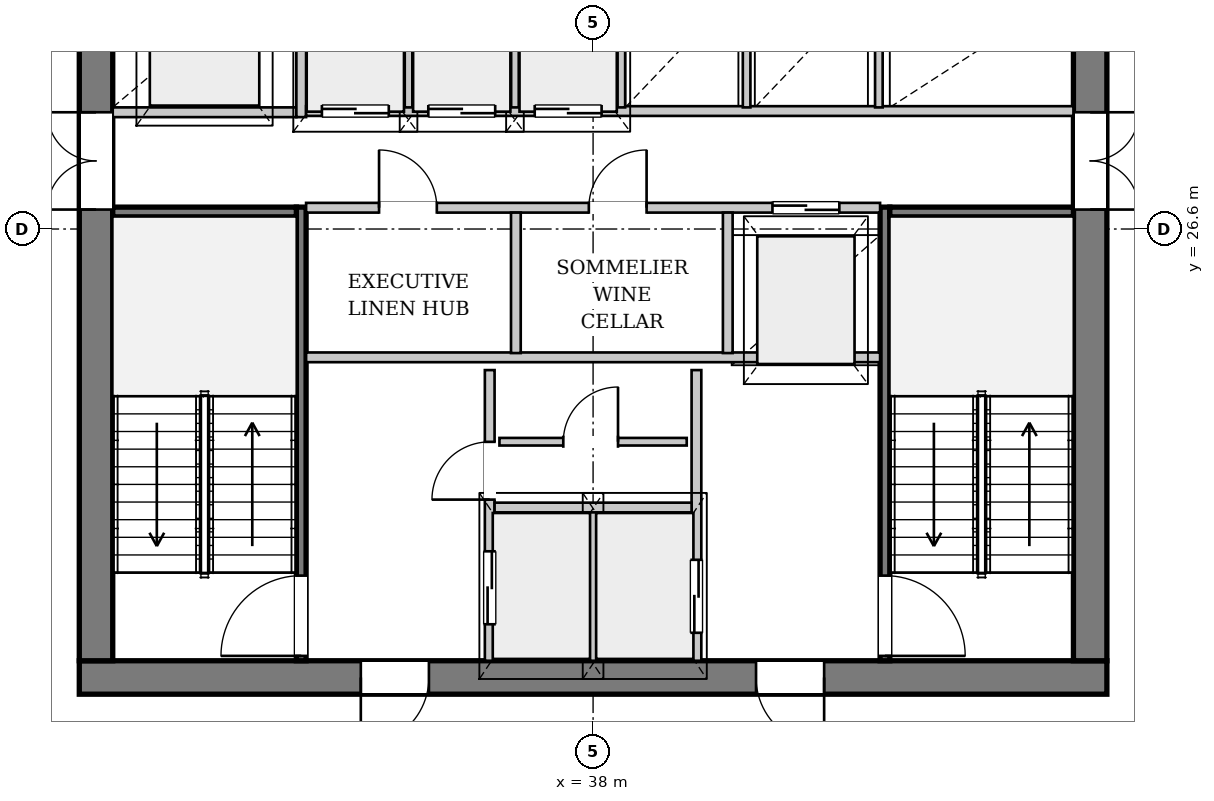
"""IFC4 building model, lengths in metres.
Left out: names, types, materials, properties, quantities, classifications, styles, units other than length and angle.
Written with IfcOpenShell. Run it as: python <this file> out.ifc"""

import sys

from ifc_helpers import new_model, si_unit, direction, frame, frame_2d, origin, place, context, subcontext, project, spatial, rectangle, extrude, source, transform, mapped, element, fill, save


model = new_model("IFC4")
c1 = context("Model", 3, precision=1e-05, world=origin(), true_north=direction((0.0, 1.0)))
c2 = subcontext(c1, "Body", "Model", "MODEL_VIEW")
j1 = project(units=[si_unit("LENGTHUNIT", "METRE"), si_unit("PLANEANGLEUNIT", "RADIAN")], contexts=[c1])
p1 = place(None, origin())
s1 = spatial("IfcSite", under=j1, at=p1, CompositionType="ELEMENT")
p2 = place(p1, origin())
s2 = spatial("IfcBuilding", under=s1, at=p2, CompositionType="ELEMENT")
p3 = place(p2, frame((0.0, 0.0, 189.2)))
s3 = spatial("IfcBuildingStorey", under=s2, at=p3, CompositionType="ELEMENT", Elevation=189.2)
p4 = place(p3, frame((53.032, 21.835, 0.0), z_axis=(0.0, 0.0, 1.0), x_axis=(-0.573201612269, -0.819414371178, 0.0)))
e1 = element("IfcWall", 1, at=p4, inside=s3, PredefinedType="SOLIDWALL", context=c2, shape_type="SweptSolid", body=[
    extrude(rectangle(XDim=23.255, YDim=0.32, at=frame_2d((11.627, 0.0))), origin(), (0.0, 0.0, 1.0), 2.722),
])
p5 = place(p4, frame((6.691, 0.0, 0.0)))
e2 = element("IfcOpeningElement", 2, at=p5, cuts=e1, PredefinedType="OPENING", context=c2, shape_type="SweptSolid", body=[
    extrude(rectangle(XDim=1.5, YDim=2.3, at=frame_2d((0.75, 1.15))), frame((0.0, 0.17, 0.0), z_axis=(0.0, -1.0, 0.0), x_axis=(1.0, 0.0, 0.0)), (0.0, 0.0, 1.0), 0.34),
])
p6 = place(p4, frame((14.308, 0.0, 0.252)))
e3 = element("IfcOpeningElement", 3, at=p6, cuts=e1, PredefinedType="OPENING", context=c2, shape_type="SweptSolid", body=[
    extrude(rectangle(XDim=2.6, YDim=2.35, at=frame_2d((1.3, 1.175))), frame((0.0, 0.17, 0.0), z_axis=(0.0, -1.0, 0.0), x_axis=(1.0, 0.0, 0.0)), (0.0, 0.0, 1.0), 0.34),
])
p7 = place(p4, frame((2.957, 0.0, 0.65)))
e4 = element("IfcOpeningElement", 4, at=p7, cuts=e1, PredefinedType="OPENING", context=c2, shape_type="SweptSolid", body=[
    extrude(rectangle(XDim=1.2, YDim=1.5, at=frame_2d((0.6, 0.75))), frame((0.0, 0.17, 0.0), z_axis=(0.0, -1.0, 0.0), x_axis=(1.0, 0.0, 0.0)), (0.0, 0.0, 1.0), 0.34),
])
p8 = place(p3, frame((46.45, 19.225, 0.0), z_axis=(0.0, 0.0, 1.0), x_axis=(-1.0, 0.0, 0.0)))
e5 = element("IfcWall", 5, at=p8, inside=s3, PredefinedType="SHEAR", context=c2, shape_type="SweptSolid", body=[
    extrude(rectangle(XDim=16.9, YDim=0.55, at=frame_2d((8.45, 0.0))), origin(), (0.0, 0.0, 1.0), 3.33),
])
p9 = place(p8, frame((4.65, 0.0, 0.0)))
e6 = element("IfcOpeningElement", 6, at=p9, cuts=e5, PredefinedType="OPENING", context=c2, shape_type="SweptSolid", body=[
    extrude(rectangle(XDim=1.12, YDim=2.25, at=frame_2d((0.56, 1.125))), frame((0.0, 0.285, 0.0), z_axis=(0.0, -1.0, 0.0), x_axis=(1.0, 0.0, 0.0)), (0.0, 0.0, 1.0), 0.57),
])
p10 = place(p8, frame((11.15, 0.0, 0.0)))
e7 = element("IfcOpeningElement", 7, at=p10, cuts=e5, PredefinedType="OPENING", context=c2, shape_type="SweptSolid", body=[
    extrude(rectangle(XDim=1.12, YDim=2.25, at=frame_2d((0.56, 1.125))), frame((0.0, 0.285, 0.0), z_axis=(0.0, -1.0, 0.0), x_axis=(1.0, 0.0, 0.0)), (0.0, 0.0, 1.0), 0.57),
])
p11 = place(p3, frame((29.825, 19.5, 0.0), z_axis=(0.0, 0.0, 1.0), x_axis=(0.0, 1.0, 0.0)))
e8 = element("IfcWall", 8, at=p11, inside=s3, PredefinedType="SHEAR", context=c2, shape_type="SweptSolid", body=[
    extrude(rectangle(XDim=14.2, YDim=0.55, at=frame_2d((7.1, 0.0))), origin(), (0.0, 0.0, 1.0), 3.33),
])
p12 = place(p11, frame((7.42, 0.0, 0.0)))
e9 = element("IfcOpeningElement", 9, at=p12, cuts=e8, PredefinedType="OPENING", context=c2, shape_type="SweptSolid", body=[
    extrude(rectangle(XDim=1.6, YDim=2.2, at=frame_2d((0.8, 1.1))), frame((0.0, 0.285, 0.0), z_axis=(0.0, -1.0, 0.0), x_axis=(1.0, 0.0, 0.0)), (0.0, 0.0, 1.0), 0.57),
])
p13 = place(p3, frame((46.175, 33.7, 0.0), z_axis=(0.0, 0.0, 1.0), x_axis=(0.0, -1.0, 0.0)))
e10 = element("IfcWall", 10, at=p13, inside=s3, PredefinedType="SHEAR", context=c2, shape_type="SweptSolid", body=[
    extrude(rectangle(XDim=14.2, YDim=0.55, at=frame_2d((7.1, 0.0))), origin(), (0.0, 0.0, 1.0), 3.33),
])
p14 = place(p13, frame((5.18, 0.0, 0.0)))
e11 = element("IfcOpeningElement", 11, at=p14, cuts=e10, PredefinedType="OPENING", context=c2, shape_type="SweptSolid", body=[
    extrude(rectangle(XDim=1.6, YDim=2.2, at=frame_2d((0.8, 1.1))), frame((0.0, 0.285, 0.0), z_axis=(0.0, -1.0, 0.0), x_axis=(1.0, 0.0, 0.0)), (0.0, 0.0, 1.0), 0.57),
])
p15 = place(p13, frame((2.05, 0.0, 0.0)))
e12 = element("IfcOpeningElement", 12, at=p15, cuts=e10, PredefinedType="OPENING", context=c2, shape_type="SweptSolid", body=[
    extrude(rectangle(XDim=0.95, YDim=2.1, at=frame_2d((0.475, 1.05))), frame((0.0, 0.285, 0.0), z_axis=(0.0, -1.0, 0.0), x_axis=(1.0, 0.0, 0.0)), (0.0, 0.0, 1.0), 0.57),
])
p16 = place(p3, frame((33.2, 19.5, 0.0), z_axis=(0.0, 0.0, 1.0), x_axis=(0.0, 1.0, 0.0)))
e13 = element("IfcWall", 13, at=p16, inside=s3, PredefinedType="PARTITIONING", context=c2, shape_type="SweptSolid", body=[
    extrude(rectangle(XDim=7.46, YDim=0.16, at=frame_2d((3.73, 0.0))), origin(), (0.0, 0.0, 1.0), 3.33),
])
p17 = place(p16, frame((0.08, 0.0, 0.0)))
e14 = element("IfcOpeningElement", 14, at=p17, cuts=e13, PredefinedType="OPENING", context=c2, shape_type="SweptSolid", body=[
    extrude(rectangle(XDim=1.32, YDim=2.2, at=frame_2d((0.66, 1.1))), frame((0.0, 0.09, 0.0), z_axis=(0.0, -1.0, 0.0), x_axis=(1.0, 0.0, 0.0)), (0.0, 0.0, 1.0), 0.18),
])
p18 = place(p3, frame((30.1, 26.88, 0.0), z_axis=(0.0, 0.0, 1.0), x_axis=(1.0, 0.0, 0.0)))
e15 = element("IfcWall", 15, at=p18, inside=s3, PredefinedType="PARTITIONING", context=c2, shape_type="SweptSolid", body=[
    extrude(rectangle(XDim=3.02, YDim=0.16, at=frame_2d((1.51, 0.0))), origin(), (0.0, 0.0, 1.0), 3.33),
])
p19 = place(p3, frame((42.8, 26.96, 0.0), z_axis=(0.0, 0.0, 1.0), x_axis=(0.0, -1.0, 0.0)))
e16 = element("IfcWall", 16, at=p19, inside=s3, PredefinedType="PARTITIONING", context=c2, shape_type="SweptSolid", body=[
    extrude(rectangle(XDim=7.46, YDim=0.16, at=frame_2d((3.73, 0.0))), origin(), (0.0, 0.0, 1.0), 3.33),
])
p20 = place(p19, frame((6.06, 0.0, 0.0)))
e17 = element("IfcOpeningElement", 17, at=p20, cuts=e16, PredefinedType="OPENING", context=c2, shape_type="SweptSolid", body=[
    extrude(rectangle(XDim=1.32, YDim=2.2, at=frame_2d((0.66, 1.1))), frame((0.0, 0.09, 0.0), z_axis=(0.0, -1.0, 0.0), x_axis=(1.0, 0.0, 0.0)), (0.0, 0.0, 1.0), 0.18),
])
p21 = place(p3, frame((42.88, 26.88, 0.0), z_axis=(0.0, 0.0, 1.0), x_axis=(1.0, 0.0, 0.0)))
e18 = element("IfcWall", 18, at=p21, inside=s3, PredefinedType="PARTITIONING", context=c2, shape_type="SweptSolid", body=[
    extrude(rectangle(XDim=3.02, YDim=0.16, at=frame_2d((1.51, 0.0))), origin(), (0.0, 0.0, 1.0), 3.33),
])
p22 = place(p3, frame((36.3, 19.5, 0.0), z_axis=(0.0, 0.0, 1.0), x_axis=(0.0, 1.0, 0.0)))
e19 = element("IfcWall", 19, at=p22, inside=s3, PredefinedType="PARTITIONING", context=c2, shape_type="SweptSolid", body=[
    extrude(rectangle(XDim=4.78, YDim=0.16, at=frame_2d((2.39, 0.0))), origin(), (0.0, 0.0, 1.0), 3.33),
])
p23 = place(p22, frame((0.6, 0.0, 0.0)))
e20 = element("IfcOpeningElement", 20, at=p23, cuts=e19, PredefinedType="OPENING", context=c2, shape_type="SweptSolid", body=[
    extrude(rectangle(XDim=1.2, YDim=2.2, at=frame_2d((0.6, 1.1))), frame((0.0, 0.09, 0.0), z_axis=(0.0, -1.0, 0.0), x_axis=(1.0, 0.0, 0.0)), (0.0, 0.0, 1.0), 0.18),
])
p24 = place(p22, frame((2.65, 0.0, 0.0)))
e21 = element("IfcOpeningElement", 21, at=p24, cuts=e19, PredefinedType="OPENING", context=c2, shape_type="SweptSolid", body=[
    extrude(rectangle(XDim=0.95, YDim=2.1, at=frame_2d((0.475, 1.05))), frame((0.0, 0.09, 0.0), z_axis=(0.0, -1.0, 0.0), x_axis=(1.0, 0.0, 0.0)), (0.0, 0.0, 1.0), 0.18),
])
p25 = place(p3, frame((39.7, 24.28, 0.0), z_axis=(0.0, 0.0, 1.0), x_axis=(0.0, -1.0, 0.0)))
e22 = element("IfcWall", 22, at=p25, inside=s3, PredefinedType="PARTITIONING", context=c2, shape_type="SweptSolid", body=[
    extrude(rectangle(XDim=4.78, YDim=0.16, at=frame_2d((2.39, 0.0))), origin(), (0.0, 0.0, 1.0), 3.33),
])
p26 = place(p25, frame((3.12, 0.0, 0.0)))
e23 = element("IfcOpeningElement", 23, at=p26, cuts=e22, PredefinedType="OPENING", context=c2, shape_type="SweptSolid", body=[
    extrude(rectangle(XDim=1.2, YDim=2.2, at=frame_2d((0.6, 1.1))), frame((0.0, 0.09, 0.0), z_axis=(0.0, -1.0, 0.0), x_axis=(1.0, 0.0, 0.0)), (0.0, 0.0, 1.0), 0.18),
])
p27 = place(p3, frame((38.0, 19.5, 0.0), z_axis=(0.0, 0.0, 1.0), x_axis=(0.0, 1.0, 0.0)))
e24 = element("IfcWall", 24, at=p27, inside=s3, PredefinedType="PARTITIONING", context=c2, shape_type="SweptSolid", body=[
    extrude(rectangle(XDim=2.46, YDim=0.125, at=frame_2d((1.23, 0.0))), origin(), (0.0, 0.0, 1.0), 3.33),
])
p28 = place(p3, frame((36.38, 22.02, 0.0), z_axis=(0.0, 0.0, 1.0), x_axis=(1.0, 0.0, 0.0)))
e25 = element("IfcWall", 25, at=p28, inside=s3, PredefinedType="PARTITIONING", context=c2, shape_type="SweptSolid", body=[
    extrude(rectangle(XDim=3.24, YDim=0.16, at=frame_2d((1.62, 0.0))), origin(), (0.0, 0.0, 1.0), 3.33),
])
p29 = place(p3, frame((33.28, 24.49, 0.0), z_axis=(0.0, 0.0, 1.0), x_axis=(1.0, 0.0, 0.0)))
e26 = element("IfcWall", 26, at=p29, inside=s3, PredefinedType="PARTITIONING", context=c2, shape_type="SweptSolid", body=[
    extrude(rectangle(XDim=9.44, YDim=0.16, at=frame_2d((4.72, 0.0))), origin(), (0.0, 0.0, 1.0), 3.33),
])
p30 = place(p3, frame((36.46, 23.102, 0.0), z_axis=(0.0, 0.0, 1.0), x_axis=(1.0, 0.0, 0.0)))
e27 = element("IfcWall", 27, at=p30, inside=s3, PredefinedType="PARTITIONING", context=c2, shape_type="SweptSolid", body=[
    extrude(rectangle(XDim=3.08, YDim=0.125, at=frame_2d((1.54, 0.0))), origin(), (0.0, 0.0, 1.0), 3.33),
])
p31 = place(p30, frame((1.05, 0.0, 0.0)))
e28 = element("IfcOpeningElement", 28, at=p31, cuts=e27, PredefinedType="OPENING", context=c2, shape_type="SweptSolid", body=[
    extrude(rectangle(XDim=0.9, YDim=2.1, at=frame_2d((0.45, 1.05))), frame((0.0, 0.073, 0.0), z_axis=(0.0, -1.0, 0.0), x_axis=(1.0, 0.0, 0.0)), (0.0, 0.0, 1.0), 0.145),
])
p32 = place(p3, frame((30.1, 28.52, 0.0), z_axis=(0.0, 0.0, 1.0), x_axis=(1.0, 0.0, 0.0)))
e29 = element("IfcWall", 29, at=p32, inside=s3, PredefinedType="PARTITIONING", context=c2, shape_type="SweptSolid", body=[
    extrude(rectangle(XDim=3.02, YDim=0.16, at=frame_2d((1.51, 0.0))), origin(), (0.0, 0.0, 1.0), 3.33),
])
p33 = place(p3, frame((33.2, 28.44, 0.0), z_axis=(0.0, 0.0, 1.0), x_axis=(0.0, 1.0, 0.0)))
e30 = element("IfcWall", 30, at=p33, inside=s3, PredefinedType="PARTITIONING", context=c2, shape_type="SweptSolid", body=[
    extrude(rectangle(XDim=5.26, YDim=0.16, at=frame_2d((2.63, 0.0))), origin(), (0.0, 0.0, 1.0), 3.33),
])
p34 = place(p3, frame((33.28, 26.95, 0.0), z_axis=(0.0, 0.0, 1.0), x_axis=(1.0, 0.0, 0.0)))
e31 = element("IfcWall", 31, at=p34, inside=s3, PredefinedType="PARTITIONING", context=c2, shape_type="SweptSolid", body=[
    extrude(rectangle(XDim=9.44, YDim=0.16, at=frame_2d((4.72, 0.0))), origin(), (0.0, 0.0, 1.0), 3.33),
])
p35 = place(p34, frame((1.2, 0.0, 0.0)))
e32 = element("IfcOpeningElement", 32, at=p35, cuts=e31, PredefinedType="OPENING", context=c2, shape_type="SweptSolid", body=[
    extrude(rectangle(XDim=0.95, YDim=2.1, at=frame_2d((0.475, 1.05))), frame((0.0, 0.09, 0.0), z_axis=(0.0, -1.0, 0.0), x_axis=(1.0, 0.0, 0.0)), (0.0, 0.0, 1.0), 0.18),
])
p36 = place(p34, frame((4.65, 0.0, 0.0)))
e33 = element("IfcOpeningElement", 33, at=p36, cuts=e31, PredefinedType="OPENING", context=c2, shape_type="SweptSolid", body=[
    extrude(rectangle(XDim=0.95, YDim=2.1, at=frame_2d((0.475, 1.05))), frame((0.0, 0.09, 0.0), z_axis=(0.0, -1.0, 0.0), x_axis=(1.0, 0.0, 0.0)), (0.0, 0.0, 1.0), 0.18),
])
p37 = place(p34, frame((7.67, 0.0, 0.0)))
e34 = element("IfcOpeningElement", 34, at=p37, cuts=e31, PredefinedType="OPENING", context=c2, shape_type="SweptSolid", body=[
    extrude(rectangle(XDim=1.1, YDim=2.2, at=frame_2d((0.55, 1.1))), frame((0.0, 0.09, 0.0), z_axis=(0.0, -1.0, 0.0), x_axis=(1.0, 0.0, 0.0)), (0.0, 0.0, 1.0), 0.18),
])
for number, where, z_axis, x_axis in (
    (35, (36.73, 24.56, 0.0), (0.0, 0.0, 1.0), (0.0, 1.0, 0.0)),
    (36, (40.215, 24.56, 0.0), (0.0, 0.0, 1.0), (0.0, 1.0, 0.0)),
):
    element("IfcWall", number, at=place(p3, frame(where, z_axis=z_axis, x_axis=x_axis)), inside=s3, PredefinedType="PARTITIONING", context=c2, shape_type="SweptSolid", body=[
        extrude(rectangle(XDim=2.31, YDim=0.16, at=frame_2d((1.155, 0.0))), origin(), (0.0, 0.0, 1.0), 3.33),
    ])
p38 = place(p3, frame((33.28, 28.54, 0.0), z_axis=(0.0, 0.0, 1.0), x_axis=(1.0, 0.0, 0.0)))
e37 = element("IfcWall", 37, at=p38, inside=s3, PredefinedType="PARTITIONING", context=c2, shape_type="SweptSolid", body=[
    extrude(rectangle(XDim=12.62, YDim=0.16, at=frame_2d((6.31, 0.0))), origin(), (0.0, 0.0, 1.0), 3.33),
])
p39 = place(p38, frame((0.26, 0.0, 0.0)))
e38 = element("IfcOpeningElement", 38, at=p39, cuts=e37, PredefinedType="OPENING", context=c2, shape_type="SweptSolid", body=[
    extrude(rectangle(XDim=1.1, YDim=2.2, at=frame_2d((0.55, 1.1))), frame((0.0, 0.09, 0.0), z_axis=(0.0, -1.0, 0.0), x_axis=(1.0, 0.0, 0.0)), (0.0, 0.0, 1.0), 0.18),
])
p40 = place(p38, frame((2.01, 0.0, 0.0)))
e39 = element("IfcOpeningElement", 39, at=p40, cuts=e37, PredefinedType="OPENING", context=c2, shape_type="SweptSolid", body=[
    extrude(rectangle(XDim=1.1, YDim=2.2, at=frame_2d((0.55, 1.1))), frame((0.0, 0.09, 0.0), z_axis=(0.0, -1.0, 0.0), x_axis=(1.0, 0.0, 0.0)), (0.0, 0.0, 1.0), 0.18),
])
p41 = place(p38, frame((3.76, 0.0, 0.0)))
e40 = element("IfcOpeningElement", 40, at=p41, cuts=e37, PredefinedType="OPENING", context=c2, shape_type="SweptSolid", body=[
    extrude(rectangle(XDim=1.1, YDim=2.2, at=frame_2d((0.55, 1.1))), frame((0.0, 0.09, 0.0), z_axis=(0.0, -1.0, 0.0), x_axis=(1.0, 0.0, 0.0)), (0.0, 0.0, 1.0), 0.18),
])
for number, where, z_axis, x_axis in (
    (41, (34.965, 28.6, 0.0), (0.0, 0.0, 1.0), (0.0, 1.0, 0.0)),
    (42, (36.715, 28.6, 0.0), (0.0, 0.0, 1.0), (0.0, 1.0, 0.0)),
    (43, (38.465, 28.6, 0.0), (0.0, 0.0, 1.0), (0.0, 1.0, 0.0)),
    (44, (40.525, 28.6, 0.0), (0.0, 0.0, 1.0), (0.0, 1.0, 0.0)),
    (45, (42.7, 28.6, 0.0), (0.0, 0.0, 1.0), (0.0, 1.0, 0.0)),
):
    element("IfcWall", number, at=place(p3, frame(where, z_axis=z_axis, x_axis=x_axis)), inside=s3, PredefinedType="PARTITIONING", context=c2, shape_type="SweptSolid", body=[
        extrude(rectangle(XDim=1.92, YDim=0.125, at=frame_2d((0.96, 0.0))), origin(), (0.0, 0.0, 1.0), 3.33),
    ])
m1 = source(origin(), c2, "Body", "SweptSolid", [
    extrude(rectangle(XDim=1.12, YDim=2.25, at=frame_2d((0.56, 1.125))), frame((0.0, 0.025, 0.0), z_axis=(0.0, -1.0, 0.0), x_axis=(1.0, 0.0, 0.0)), (0.0, 0.0, 1.0), 0.05),
])
p42 = place(p9, origin())
e46 = element("IfcDoor", 46, at=p42, inside=s3, OperationType="SINGLE_SWING_LEFT", PredefinedType="DOOR", context=c2, shape_type="MappedRepresentation", body=[
    mapped(m1, transform((0.0, 0.0, 0.0), x_axis=(1.0, 0.0, 0.0), y_axis=(0.0, 1.0, 0.0), z_axis=(0.0, 0.0, 1.0), scale=1.0)),
])
fill(e6, e46)
p43 = place(p10, origin())
e47 = element("IfcDoor", 47, at=p43, inside=s3, OperationType="SINGLE_SWING_RIGHT", PredefinedType="DOOR", context=c2, shape_type="MappedRepresentation", body=[
    mapped(m1, transform((0.0, 0.0, 0.0), x_axis=(1.0, 0.0, 0.0), y_axis=(0.0, 1.0, 0.0), z_axis=(0.0, 0.0, 1.0), scale=1.0)),
])
fill(e7, e47)
m2 = source(origin(), c2, "Body", "SweptSolid", [
    extrude(rectangle(XDim=1.6, YDim=2.2, at=frame_2d((0.8, 1.1))), frame((0.0, 0.025, 0.0), z_axis=(0.0, -1.0, 0.0), x_axis=(1.0, 0.0, 0.0)), (0.0, 0.0, 1.0), 0.05),
])
p44 = place(p12, origin())
e48 = element("IfcDoor", 48, at=p44, inside=s3, OperationType="DOUBLE_DOOR_SINGLE_SWING", PredefinedType="DOOR", context=c2, shape_type="MappedRepresentation", body=[
    mapped(m2, transform((0.0, 0.0, 0.0), x_axis=(1.0, 0.0, 0.0), y_axis=(0.0, 1.0, 0.0), z_axis=(0.0, 0.0, 1.0), scale=1.0)),
])
fill(e9, e48)
p45 = place(p14, origin())
e49 = element("IfcDoor", 49, at=p45, inside=s3, OperationType="DOUBLE_DOOR_SINGLE_SWING", PredefinedType="DOOR", context=c2, shape_type="MappedRepresentation", body=[
    mapped(m2, transform((0.0, 0.0, 0.0), x_axis=(1.0, 0.0, 0.0), y_axis=(0.0, 1.0, 0.0), z_axis=(0.0, 0.0, 1.0), scale=1.0)),
])
fill(e11, e49)
m3 = source(origin(), c2, "Body", "SweptSolid", [
    extrude(rectangle(XDim=1.32, YDim=2.2, at=frame_2d((0.66, 1.1))), frame((0.0, 0.025, 0.0), z_axis=(0.0, -1.0, 0.0), x_axis=(1.0, 0.0, 0.0)), (0.0, 0.0, 1.0), 0.05),
])
p46 = place(p17, origin())
e50 = element("IfcDoor", 50, at=p46, inside=s3, OperationType="SINGLE_SWING_LEFT", PredefinedType="DOOR", context=c2, shape_type="MappedRepresentation", body=[
    mapped(m3, transform((0.0, 0.0, 0.0), x_axis=(1.0, 0.0, 0.0), y_axis=(0.0, 1.0, 0.0), z_axis=(0.0, 0.0, 1.0), scale=1.0)),
])
fill(e14, e50)
p47 = place(p20, origin())
e51 = element("IfcDoor", 51, at=p47, inside=s3, OperationType="SINGLE_SWING_RIGHT", PredefinedType="DOOR", context=c2, shape_type="MappedRepresentation", body=[
    mapped(m3, transform((0.0, 0.0, 0.0), x_axis=(1.0, 0.0, 0.0), y_axis=(0.0, 1.0, 0.0), z_axis=(0.0, 0.0, 1.0), scale=1.0)),
])
fill(e17, e51)
m4 = source(origin(), c2, "Body", "SweptSolid", [
    extrude(rectangle(XDim=1.2, YDim=2.2, at=frame_2d((0.6, 1.1))), frame((0.0, 0.025, 0.0), z_axis=(0.0, -1.0, 0.0), x_axis=(1.0, 0.0, 0.0)), (0.0, 0.0, 1.0), 0.05),
])
p48 = place(p23, origin())
e52 = element("IfcDoor", 52, at=p48, inside=s3, OperationType="DOUBLE_DOOR_SLIDING", PredefinedType="DOOR", context=c2, shape_type="MappedRepresentation", body=[
    mapped(m4, transform((0.0, 0.0, 0.0), x_axis=(1.0, 0.0, 0.0), y_axis=(0.0, 1.0, 0.0), z_axis=(0.0, 0.0, 1.0), scale=1.0)),
])
fill(e20, e52)
m5 = source(origin(), c2, "Body", "SweptSolid", [
    extrude(rectangle(XDim=0.95, YDim=2.1, at=frame_2d((0.475, 1.05))), frame((0.0, 0.025, 0.0), z_axis=(0.0, -1.0, 0.0), x_axis=(1.0, 0.0, 0.0)), (0.0, 0.0, 1.0), 0.05),
])
p49 = place(p24, origin())
e53 = element("IfcDoor", 53, at=p49, inside=s3, OperationType="SINGLE_SWING_LEFT", PredefinedType="DOOR", context=c2, shape_type="MappedRepresentation", body=[
    mapped(m5, transform((0.0, 0.0, 0.0), x_axis=(1.0, 0.0, 0.0), y_axis=(0.0, 1.0, 0.0), z_axis=(0.0, 0.0, 1.0), scale=1.0)),
])
fill(e21, e53)
m6 = source(origin(), c2, "Body", "SweptSolid", [
    extrude(rectangle(XDim=0.9, YDim=2.1, at=frame_2d((0.45, 1.05))), frame((0.0, 0.025, 0.0), z_axis=(0.0, -1.0, 0.0), x_axis=(1.0, 0.0, 0.0)), (0.0, 0.0, 1.0), 0.05),
])
p50 = place(p31, origin())
e54 = element("IfcDoor", 54, at=p50, inside=s3, OperationType="SINGLE_SWING_RIGHT", PredefinedType="DOOR", context=c2, shape_type="MappedRepresentation", body=[
    mapped(m6, transform((0.0, 0.0, 0.0), x_axis=(1.0, 0.0, 0.0), y_axis=(0.0, 1.0, 0.0), z_axis=(0.0, 0.0, 1.0), scale=1.0)),
])
fill(e28, e54)
p51 = place(p26, origin())
e55 = element("IfcDoor", 55, at=p51, inside=s3, OperationType="DOUBLE_DOOR_SLIDING", PredefinedType="DOOR", context=c2, shape_type="MappedRepresentation", body=[
    mapped(m4, transform((0.0, 0.0, 0.0), x_axis=(1.0, 0.0, 0.0), y_axis=(0.0, 1.0, 0.0), z_axis=(0.0, 0.0, 1.0), scale=1.0)),
])
fill(e23, e55)
p52 = place(p35, origin())
e56 = element("IfcDoor", 56, at=p52, inside=s3, OperationType="SINGLE_SWING_LEFT", PredefinedType="DOOR", context=c2, shape_type="MappedRepresentation", body=[
    mapped(m5, transform((0.0, 0.0, 0.0), x_axis=(1.0, 0.0, 0.0), y_axis=(0.0, 1.0, 0.0), z_axis=(0.0, 0.0, 1.0), scale=1.0)),
])
fill(e32, e56)
p53 = place(p36, origin())
e57 = element("IfcDoor", 57, at=p53, inside=s3, OperationType="SINGLE_SWING_RIGHT", PredefinedType="DOOR", context=c2, shape_type="MappedRepresentation", body=[
    mapped(m5, transform((0.0, 0.0, 0.0), x_axis=(1.0, 0.0, 0.0), y_axis=(0.0, 1.0, 0.0), z_axis=(0.0, 0.0, 1.0), scale=1.0)),
])
fill(e33, e57)
m7 = source(origin(), c2, "Body", "SweptSolid", [
    extrude(rectangle(XDim=1.1, YDim=2.2, at=frame_2d((0.55, 1.1))), frame((0.0, 0.025, 0.0), z_axis=(0.0, -1.0, 0.0), x_axis=(1.0, 0.0, 0.0)), (0.0, 0.0, 1.0), 0.05),
])
p54 = place(p37, origin())
e58 = element("IfcDoor", 58, at=p54, inside=s3, OperationType="DOUBLE_DOOR_SLIDING", PredefinedType="DOOR", context=c2, shape_type="MappedRepresentation", body=[
    mapped(m7, transform((0.0, 0.0, 0.0), x_axis=(1.0, 0.0, 0.0), y_axis=(0.0, 1.0, 0.0), z_axis=(0.0, 0.0, 1.0), scale=1.0)),
])
fill(e34, e58)
p55 = place(p39, origin())
e59 = element("IfcDoor", 59, at=p55, inside=s3, OperationType="DOUBLE_DOOR_SLIDING", PredefinedType="DOOR", context=c2, shape_type="MappedRepresentation", body=[
    mapped(m7, transform((0.0, 0.0, 0.0), x_axis=(1.0, 0.0, 0.0), y_axis=(0.0, 1.0, 0.0), z_axis=(0.0, 0.0, 1.0), scale=1.0)),
])
fill(e38, e59)
p56 = place(p40, origin())
e60 = element("IfcDoor", 60, at=p56, inside=s3, OperationType="DOUBLE_DOOR_SLIDING", PredefinedType="DOOR", context=c2, shape_type="MappedRepresentation", body=[
    mapped(m7, transform((0.0, 0.0, 0.0), x_axis=(1.0, 0.0, 0.0), y_axis=(0.0, 1.0, 0.0), z_axis=(0.0, 0.0, 1.0), scale=1.0)),
])
fill(e39, e60)
p57 = place(p41, origin())
e61 = element("IfcDoor", 61, at=p57, inside=s3, OperationType="DOUBLE_DOOR_SLIDING", PredefinedType="DOOR", context=c2, shape_type="MappedRepresentation", body=[
    mapped(m7, transform((0.0, 0.0, 0.0), x_axis=(1.0, 0.0, 0.0), y_axis=(0.0, 1.0, 0.0), z_axis=(0.0, 0.0, 1.0), scale=1.0)),
])
fill(e40, e61)
save(model, sys.argv[1])
